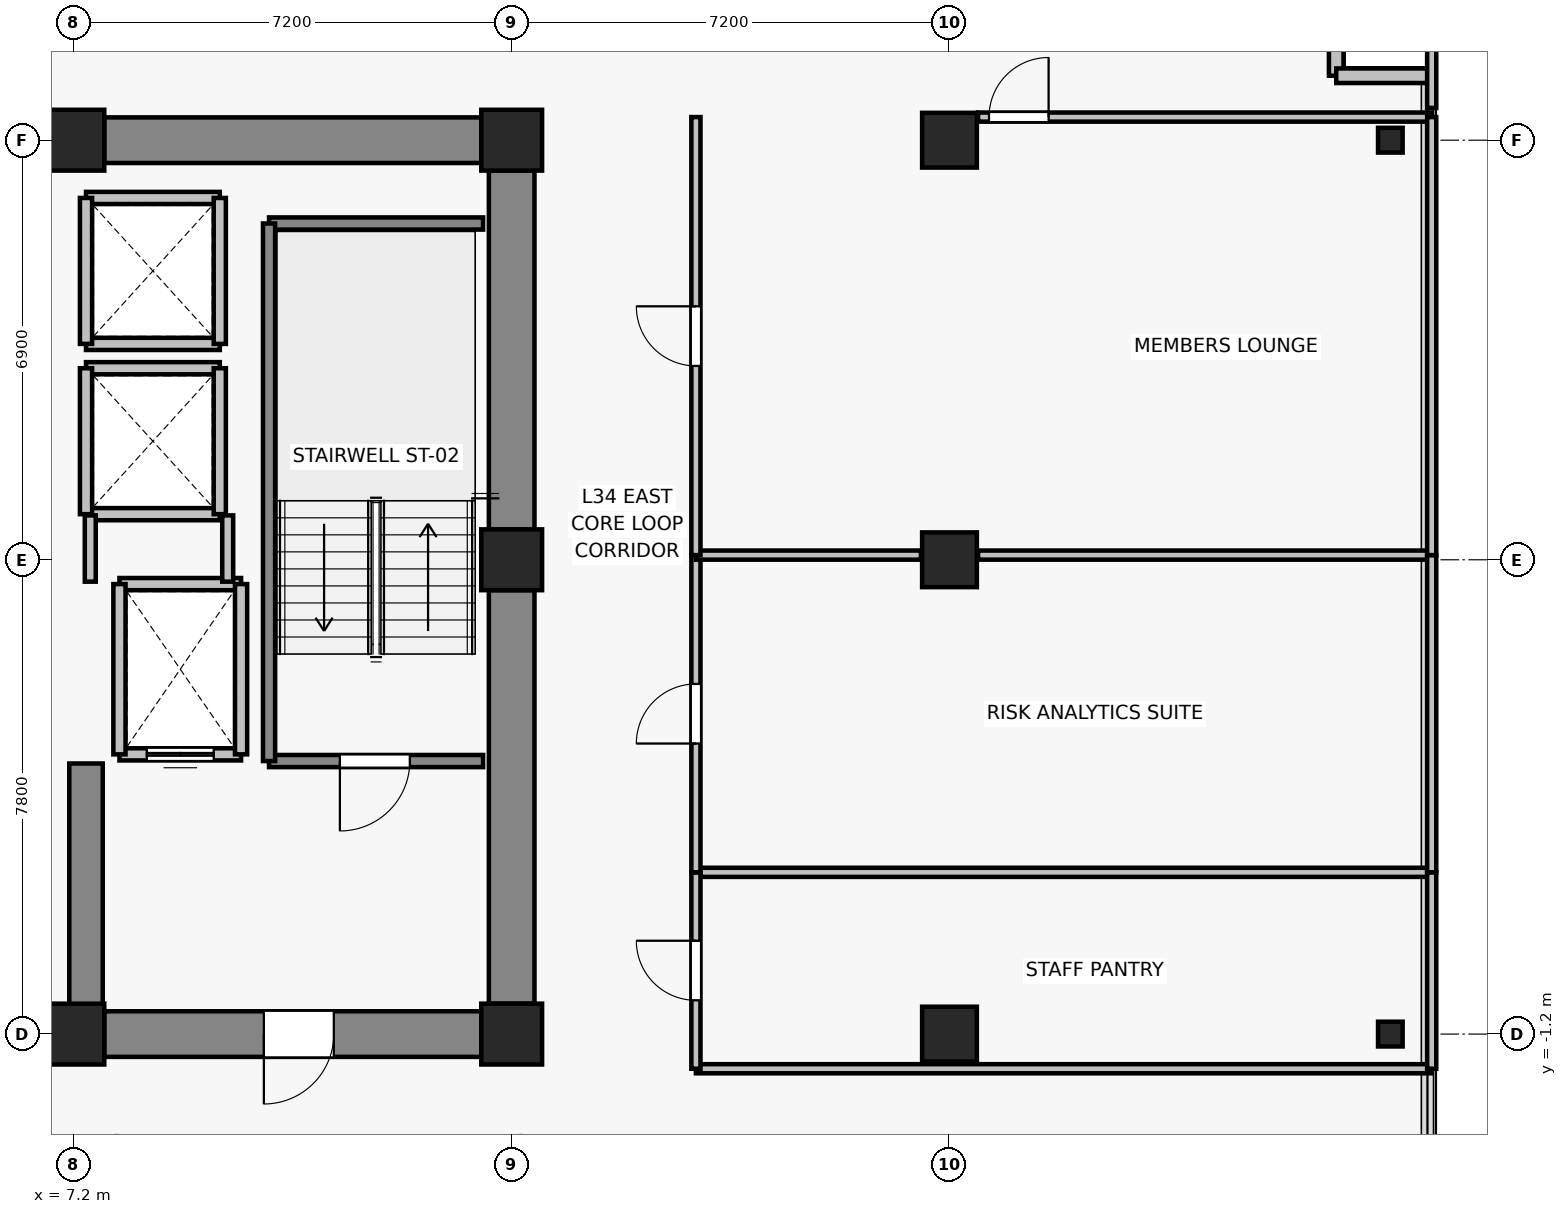
"""IFC4 building model, lengths in metres.
Left out: names, types, materials, properties, quantities, classifications, styles, units other than length and angle.
Written with IfcOpenShell. Run it as: python <this file> out.ifc"""

import sys

from ifc_helpers import new_model, si_unit, direction, frame, frame_2d, origin, origin_2d, place, context, subcontext, project, spatial, rectangle, i_section, extrude, source, transform, mapped, element, fill, save


model = new_model("IFC4")
c1 = context("Model", 3, precision=1e-05, world=origin(), true_north=direction((0.0, 1.0)))
c2 = subcontext(c1, "Body", "Model", "MODEL_VIEW")
j1 = project(units=[si_unit("LENGTHUNIT", "METRE"), si_unit("PLANEANGLEUNIT", "RADIAN")], contexts=[c1])
p1 = place(None, origin())
s1 = spatial("IfcSite", under=j1, at=p1, CompositionType="ELEMENT")
p2 = place(p1, origin())
s2 = spatial("IfcBuilding", under=s1, at=p2, CompositionType="ELEMENT")
p3 = place(p2, frame((0.0, 0.0, 123.1)))
s3 = spatial("IfcBuildingStorey", under=s2, at=p3, CompositionType="ELEMENT", Elevation=123.1)
for number, where, z_axis, x_axis in (
    (1, (7.2, -1.2, 0.0), (0.0, 0.0, 1.0), (1.0, 0.0, 0.0)),
    (2, (14.4, -1.2, 0.0), (0.0, 0.0, 1.0), (1.0, 0.0, 0.0)),
    (3, (14.4, 6.6, 0.0), (0.0, 0.0, 1.0), (1.0, 0.0, 0.0)),
    (4, (7.2, 13.5, 0.0), (0.0, 0.0, 1.0), (1.0, 0.0, 0.0)),
    (5, (14.4, 13.5, 0.0), (0.0, 0.0, 1.0), (1.0, 0.0, 0.0)),
):
    element("IfcColumn", number, at=place(p3, frame(where, z_axis=z_axis, x_axis=x_axis)), inside=s3, PredefinedType="COLUMN", context=c2, shape_type="SweptSolid", body=[
        extrude(rectangle(XDim=1.0, YDim=1.0, at=origin_2d()), origin(), (0.0, 0.0, 1.0), 3.3),
    ])
for number, where, z_axis, x_axis in (
    (6, (21.6, -1.2, 0.0), (0.0, 0.0, 1.0), (1.0, 0.0, 0.0)),
    (7, (21.6, 6.6, 0.0), (0.0, 0.0, 1.0), (1.0, 0.0, 0.0)),
    (8, (21.6, 13.5, 0.0), (0.0, 0.0, 1.0), (1.0, 0.0, 0.0)),
):
    element("IfcColumn", number, at=place(p3, frame(where, z_axis=z_axis, x_axis=x_axis)), inside=s3, PredefinedType="COLUMN", context=c2, shape_type="SweptSolid", body=[
        extrude(rectangle(XDim=0.9, YDim=0.9, at=origin_2d()), origin(), (0.0, 0.0, 1.0), 3.3),
    ])
for number, where, z_axis, x_axis in (
    (9, (28.85, -1.2, 0.0), (0.0, 0.0, 1.0), (1.0, 0.0, 0.0)),
    (10, (28.85, 13.5, 0.0), (0.0, 0.0, 1.0), (1.0, 0.0, 0.0)),
):
    element("IfcColumn", number, at=place(p3, frame(where, z_axis=z_axis, x_axis=x_axis)), inside=s3, PredefinedType="COLUMN", context=c2, shape_type="SweptSolid", body=[
        extrude(i_section(OverallWidth=0.404, OverallDepth=0.407, WebThickness=0.022, FlangeThickness=0.032, FilletRadius=0.015, at=origin_2d()), origin(), (0.0, 0.0, 1.0), 3.3),
    ])
p4 = place(p3, frame((7.7, 13.5, 0.0), z_axis=(0.0, 0.0, 1.0), x_axis=(1.0, 0.0, 0.0)))
e11 = element("IfcWall", 11, at=p4, inside=s3, PredefinedType="SHEAR", context=c2, shape_type="SweptSolid", body=[
    extrude(rectangle(XDim=6.2, YDim=0.75, at=frame_2d((3.1, 0.0))), origin(), (0.0, 0.0, 1.0), 3.075),
])
p5 = place(p3, frame((14.4, -0.7, 0.0), z_axis=(0.0, 0.0, 1.0), x_axis=(0.0, 1.0, 0.0)))
e12 = element("IfcWall", 12, at=p5, inside=s3, PredefinedType="SHEAR", context=c2, shape_type="SweptSolid", body=[
    extrude(rectangle(XDim=6.8, YDim=0.75, at=frame_2d((3.4, 0.0))), origin(), (0.0, 0.0, 1.0), 3.075),
])
p6 = place(p3, frame((14.4, 7.1, 0.0), z_axis=(0.0, 0.0, 1.0), x_axis=(0.0, 1.0, 0.0)))
e13 = element("IfcWall", 13, at=p6, inside=s3, PredefinedType="SHEAR", context=c2, shape_type="SweptSolid", body=[
    extrude(rectangle(XDim=5.9, YDim=0.75, at=frame_2d((2.95, 0.0))), origin(), (0.0, 0.0, 1.0), 3.075),
])
p7 = place(p3, frame((13.9, -1.2, 0.0), z_axis=(0.0, 0.0, 1.0), x_axis=(-1.0, 0.0, 0.0)))
e14 = element("IfcWall", 14, at=p7, inside=s3, PredefinedType="SHEAR", context=c2, shape_type="SweptSolid", body=[
    extrude(rectangle(XDim=6.2, YDim=0.75, at=frame_2d((3.1, 0.0))), origin(), (0.0, 0.0, 1.0), 3.075),
])
p8 = place(p7, frame((2.425, 0.0, 0.0)))
e15 = element("IfcOpeningElement", 15, at=p8, cuts=e14, PredefinedType="OPENING", context=c2, shape_type="SweptSolid", body=[
    extrude(rectangle(XDim=1.15, YDim=2.15, at=frame_2d((0.575, 1.075))), frame((0.0, 0.385, 0.0), z_axis=(0.0, -1.0, 0.0), x_axis=(1.0, 0.0, 0.0)), (0.0, 0.0, 1.0), 0.77),
])
p9 = place(p3, frame((7.4, -0.825, 0.0), z_axis=(0.0, 0.0, 1.0), x_axis=(0.0, 1.0, 0.0)))
e16 = element("IfcWall", 16, at=p9, inside=s3, PredefinedType="SHEAR", context=c2, shape_type="SweptSolid", body=[
    extrude(rectangle(XDim=4.075, YDim=0.55, at=frame_2d((2.038, 0.0))), origin(), (0.0, 0.0, 1.0), 3.075),
])
for number, where, z_axis, x_axis in (
    (17, (27.96, 14.56, 0.0), (0.0, 0.0, 1.0), (0.0, 1.0, 0.0)),
    (18, (29.46, 14.56, 0.0), (0.0, 0.0, 1.0), (-1.0, 0.0, 0.0)),
):
    element("IfcWall", number, at=place(p3, frame(where, z_axis=z_axis, x_axis=x_axis)), inside=s3, PredefinedType="SOLIDWALL", context=c2, shape_type="SweptSolid", body=[
        extrude(rectangle(XDim=1.5, YDim=0.24, at=frame_2d((0.75, 0.0))), origin(), (0.0, 0.0, 1.0), 3.075),
    ])
p10 = place(p3, frame((9.95, 3.4, 0.0), z_axis=(0.0, 0.0, 1.0), x_axis=(-1.0, 0.0, 0.0)))
e19 = element("IfcWall", 19, at=p10, inside=s3, PredefinedType="SOLIDWALL", context=c2, shape_type="SweptSolid", body=[
    extrude(rectangle(XDim=2.0, YDim=0.2, at=frame_2d((1.0, 0.0))), origin(), (0.0, 0.0, 1.0), 3.075),
])
p11 = place(p10, frame((0.45, 0.0, 0.0)))
e20 = element("IfcOpeningElement", 20, at=p11, cuts=e19, PredefinedType="OPENING", context=c2, shape_type="SweptSolid", body=[
    extrude(rectangle(XDim=1.1, YDim=2.2, at=frame_2d((0.55, 1.1))), frame((0.0, 0.11, 0.0), z_axis=(0.0, -1.0, 0.0), x_axis=(1.0, 0.0, 0.0)), (0.0, 0.0, 1.0), 0.22),
])
p12 = place(p3, frame((7.95, 6.2, 0.0), z_axis=(0.0, 0.0, 1.0), x_axis=(1.0, 0.0, 0.0)))
e21 = element("IfcWall", 21, at=p12, inside=s3, PredefinedType="SOLIDWALL", context=c2, shape_type="SweptSolid", body=[
    extrude(rectangle(XDim=2.0, YDim=0.2, at=frame_2d((1.0, 0.0))), origin(), (0.0, 0.0, 1.0), 3.075),
])
for number, where, z_axis, x_axis in (
    (22, (7.95, 3.4, 0.0), (0.0, 0.0, 1.0), (0.0, 1.0, 0.0)),
    (23, (9.95, 6.2, 0.0), (0.0, 0.0, 1.0), (0.0, -1.0, 0.0)),
):
    element("IfcWall", number, at=place(p3, frame(where, z_axis=z_axis, x_axis=x_axis)), inside=s3, PredefinedType="SOLIDWALL", context=c2, shape_type="SweptSolid", body=[
        extrude(rectangle(XDim=2.8, YDim=0.2, at=frame_2d((1.4, 0.0))), origin(), (0.0, 0.0, 1.0), 3.075),
    ])
for number, where, z_axis, x_axis in (
    (24, (9.6, 7.35, 0.0), (0.0, 0.0, 1.0), (-1.0, 0.0, 0.0)),
    (25, (7.4, 9.75, 0.0), (0.0, 0.0, 1.0), (1.0, 0.0, 0.0)),
):
    element("IfcWall", number, at=place(p3, frame(where, z_axis=z_axis, x_axis=x_axis)), inside=s3, PredefinedType="SOLIDWALL", context=c2, shape_type="SweptSolid", body=[
        extrude(rectangle(XDim=2.2, YDim=0.2, at=frame_2d((1.1, 0.0))), origin(), (0.0, 0.0, 1.0), 2.515),
    ])
p13 = place(p3, frame((7.4, 7.35, 0.0), z_axis=(0.0, 0.0, 1.0), x_axis=(0.0, 1.0, 0.0)))
e26 = element("IfcWall", 26, at=p13, inside=s3, PredefinedType="SOLIDWALL", context=c2, shape_type="SweptSolid", body=[
    extrude(rectangle(XDim=2.4, YDim=0.2, at=frame_2d((1.2, 0.0))), origin(), (0.0, 0.0, 1.0), 2.515),
])
p14 = place(p3, frame((9.6, 9.75, 0.0), z_axis=(0.0, 0.0, 1.0), x_axis=(0.0, -1.0, 0.0)))
e27 = element("IfcWall", 27, at=p14, inside=s3, PredefinedType="SOLIDWALL", context=c2, shape_type="SweptSolid", body=[
    extrude(rectangle(XDim=2.4, YDim=0.2, at=frame_2d((1.2, 0.0))), origin(), (0.0, 0.0, 1.0), 3.075),
])
for number, where, z_axis, x_axis in (
    (28, (9.6, 10.15, 0.0), (0.0, 0.0, 1.0), (-1.0, 0.0, 0.0)),
    (29, (7.4, 12.55, 0.0), (0.0, 0.0, 1.0), (1.0, 0.0, 0.0)),
):
    element("IfcWall", number, at=place(p3, frame(where, z_axis=z_axis, x_axis=x_axis)), inside=s3, PredefinedType="SOLIDWALL", context=c2, shape_type="SweptSolid", body=[
        extrude(rectangle(XDim=2.2, YDim=0.2, at=frame_2d((1.1, 0.0))), origin(), (0.0, 0.0, 1.0), 2.515),
    ])
p15 = place(p3, frame((7.4, 10.15, 0.0), z_axis=(0.0, 0.0, 1.0), x_axis=(0.0, 1.0, 0.0)))
e30 = element("IfcWall", 30, at=p15, inside=s3, PredefinedType="SOLIDWALL", context=c2, shape_type="SweptSolid", body=[
    extrude(rectangle(XDim=2.4, YDim=0.2, at=frame_2d((1.2, 0.0))), origin(), (0.0, 0.0, 1.0), 2.515),
])
p16 = place(p3, frame((9.6, 12.55, 0.0), z_axis=(0.0, 0.0, 1.0), x_axis=(0.0, -1.0, 0.0)))
e31 = element("IfcWall", 31, at=p16, inside=s3, PredefinedType="SOLIDWALL", context=c2, shape_type="SweptSolid", body=[
    extrude(rectangle(XDim=2.4, YDim=0.2, at=frame_2d((1.2, 0.0))), origin(), (0.0, 0.0, 1.0), 3.075),
])
p17 = place(p3, frame((13.93, 3.29, 0.0), z_axis=(0.0, 0.0, 1.0), x_axis=(-1.0, 0.0, 0.0)))
e32 = element("IfcWall", 32, at=p17, inside=s3, PredefinedType="SOLIDWALL", context=c2, shape_type="SweptSolid", body=[
    extrude(rectangle(XDim=3.52, YDim=0.2, at=frame_2d((1.76, 0.0))), origin(), (0.0, 0.0, 1.0), 3.075),
])
p18 = place(p17, frame((1.205, 0.0, 0.0)))
e33 = element("IfcOpeningElement", 33, at=p18, cuts=e32, PredefinedType="OPENING", context=c2, shape_type="SweptSolid", body=[
    extrude(rectangle(XDim=1.15, YDim=2.15, at=frame_2d((0.575, 1.075))), frame((0.0, 0.11, 0.0), z_axis=(0.0, -1.0, 0.0), x_axis=(1.0, 0.0, 0.0)), (0.0, 0.0, 1.0), 0.22),
])
p19 = place(p3, frame((10.41, 12.13, 0.0), z_axis=(0.0, 0.0, 1.0), x_axis=(1.0, 0.0, 0.0)))
e34 = element("IfcWall", 34, at=p19, inside=s3, PredefinedType="SOLIDWALL", context=c2, shape_type="SweptSolid", body=[
    extrude(rectangle(XDim=3.52, YDim=0.2, at=frame_2d((1.76, 0.0))), origin(), (0.0, 0.0, 1.0), 3.075),
])
p20 = place(p3, frame((10.41, 3.29, 0.0), z_axis=(0.0, 0.0, 1.0), x_axis=(0.0, 1.0, 0.0)))
e35 = element("IfcWall", 35, at=p20, inside=s3, PredefinedType="SOLIDWALL", context=c2, shape_type="SweptSolid", body=[
    extrude(rectangle(XDim=8.84, YDim=0.2, at=frame_2d((4.42, 0.0))), origin(), (0.0, 0.0, 1.0), 3.075),
])
p21 = place(p3, frame((7.47, 6.24, 0.0), z_axis=(0.0, 0.0, 1.0), x_axis=(0.0, 1.0, 0.0)))
e36 = element("IfcWall", 36, at=p21, inside=s3, PredefinedType="PARTITIONING", context=c2, shape_type="SweptSolid", body=[
    extrude(rectangle(XDim=1.09, YDim=0.18, at=frame_2d((0.545, 0.0))), origin(), (0.0, 0.0, 1.0), 2.515),
])
p22 = place(p3, frame((9.73, 7.33, 0.0), z_axis=(0.0, 0.0, 1.0), x_axis=(0.0, -1.0, 0.0)))
e37 = element("IfcWall", 37, at=p22, inside=s3, PredefinedType="PARTITIONING", context=c2, shape_type="SweptSolid", body=[
    extrude(rectangle(XDim=1.09, YDim=0.18, at=frame_2d((0.545, 0.0))), origin(), (0.0, 0.0, 1.0), 3.075),
])
for number, where, z_axis, x_axis in (
    (38, (29.53, -1.77, 0.0), (0.0, 0.0, 1.0), (-1.0, 0.0, 0.0)),
    (39, (17.43, 1.46, 0.0), (0.0, 0.0, 1.0), (1.0, 0.0, 0.0)),
):
    element("IfcWall", number, at=place(p3, frame(where, z_axis=z_axis, x_axis=x_axis)), inside=s3, PredefinedType="PARTITIONING", context=c2, shape_type="SweptSolid", body=[
        extrude(rectangle(XDim=12.1, YDim=0.15, at=frame_2d((6.05, 0.0))), origin(), (0.0, 0.0, 1.0), 2.515),
    ])
p23 = place(p3, frame((17.43, -1.77, 0.0), z_axis=(0.0, 0.0, 1.0), x_axis=(0.0, 1.0, 0.0)))
e40 = element("IfcWall", 40, at=p23, inside=s3, PredefinedType="PARTITIONING", context=c2, shape_type="SweptSolid", body=[
    extrude(rectangle(XDim=3.23, YDim=0.15, at=frame_2d((1.615, 0.0))), origin(), (0.0, 0.0, 1.0), 2.515),
])
p24 = place(p23, frame((1.125, 0.0, 0.0)))
e41 = element("IfcOpeningElement", 41, at=p24, cuts=e40, PredefinedType="OPENING", context=c2, shape_type="SweptSolid", body=[
    extrude(rectangle(XDim=0.98, YDim=2.15, at=frame_2d((0.49, 1.075))), frame((0.0, 0.085, 0.0), z_axis=(0.0, -1.0, 0.0), x_axis=(1.0, 0.0, 0.0)), (0.0, 0.0, 1.0), 0.17),
])
p25 = place(p3, frame((29.53, 1.46, 0.0), z_axis=(0.0, 0.0, 1.0), x_axis=(0.0, -1.0, 0.0)))
e42 = element("IfcWall", 42, at=p25, inside=s3, PredefinedType="PARTITIONING", context=c2, shape_type="SweptSolid", body=[
    extrude(rectangle(XDim=3.23, YDim=0.15, at=frame_2d((1.615, 0.0))), origin(), (0.0, 0.0, 1.0), 3.075),
])
p26 = place(p3, frame((22.07, 6.677, 0.0), z_axis=(0.0, 0.0, 1.0), x_axis=(1.0, 0.0, 0.0)))
e43 = element("IfcWall", 43, at=p26, inside=s3, PredefinedType="PARTITIONING", context=c2, shape_type="SweptSolid", body=[
    extrude(rectangle(XDim=7.46, YDim=0.15, at=frame_2d((3.73, 0.0))), origin(), (0.0, 0.0, 1.0), 2.565),
])
p27 = place(p3, frame((17.43, 1.46, 0.0), z_axis=(0.0, 0.0, 1.0), x_axis=(0.0, 1.0, 0.0)))
e44 = element("IfcWall", 44, at=p27, inside=s3, PredefinedType="PARTITIONING", context=c2, shape_type="SweptSolid", body=[
    extrude(rectangle(XDim=5.217, YDim=0.15, at=frame_2d((2.608, 0.0))), origin(), (0.0, 0.0, 1.0), 2.515),
])
p28 = place(p27, frame((2.118, 0.0, 0.0)))
e45 = element("IfcOpeningElement", 45, at=p28, cuts=e44, PredefinedType="OPENING", context=c2, shape_type="SweptSolid", body=[
    extrude(rectangle(XDim=0.98, YDim=2.15, at=frame_2d((0.49, 1.075))), frame((0.0, 0.085, 0.0), z_axis=(0.0, -1.0, 0.0), x_axis=(1.0, 0.0, 0.0)), (0.0, 0.0, 1.0), 0.17),
])
p29 = place(p3, frame((29.53, 6.677, 0.0), z_axis=(0.0, 0.0, 1.0), x_axis=(0.0, -1.0, 0.0)))
e46 = element("IfcWall", 46, at=p29, inside=s3, PredefinedType="PARTITIONING", context=c2, shape_type="SweptSolid", body=[
    extrude(rectangle(XDim=5.217, YDim=0.15, at=frame_2d((2.608, 0.0))), origin(), (0.0, 0.0, 1.0), 3.075),
])
p30 = place(p3, frame((21.13, 6.677, 0.0), z_axis=(0.0, 0.0, 1.0), x_axis=(-1.0, 0.0, 0.0)))
e47 = element("IfcWall", 47, at=p30, inside=s3, PredefinedType="PARTITIONING", context=c2, shape_type="SweptSolid", body=[
    extrude(rectangle(XDim=3.7, YDim=0.15, at=frame_2d((1.85, 0.0))), origin(), (0.0, 0.0, 1.0), 2.515),
])
p31 = place(p3, frame((22.07, 13.88, 0.0), z_axis=(0.0, 0.0, 1.0), x_axis=(1.0, 0.0, 0.0)))
e48 = element("IfcWall", 48, at=p31, inside=s3, PredefinedType="PARTITIONING", context=c2, shape_type="SweptSolid", body=[
    extrude(rectangle(XDim=7.46, YDim=0.15, at=frame_2d((3.73, 0.0))), origin(), (0.0, 0.0, 1.0), 3.075),
])
p32 = place(p31, frame((0.18, 0.0, 0.0)))
e49 = element("IfcOpeningElement", 49, at=p32, cuts=e48, PredefinedType="OPENING", context=c2, shape_type="SweptSolid", body=[
    extrude(rectangle(XDim=0.98, YDim=2.15, at=frame_2d((0.49, 1.075))), frame((0.0, 0.085, 0.0), z_axis=(0.0, -1.0, 0.0), x_axis=(1.0, 0.0, 0.0)), (0.0, 0.0, 1.0), 0.17),
])
p33 = place(p3, frame((17.43, 6.677, 0.0), z_axis=(0.0, 0.0, 1.0), x_axis=(0.0, 1.0, 0.0)))
e50 = element("IfcWall", 50, at=p33, inside=s3, PredefinedType="PARTITIONING", context=c2, shape_type="SweptSolid", body=[
    extrude(rectangle(XDim=7.203, YDim=0.15, at=frame_2d((3.602, 0.0))), origin(), (0.0, 0.0, 1.0), 2.515),
])
p34 = place(p33, frame((3.111, 0.0, 0.0)))
e51 = element("IfcOpeningElement", 51, at=p34, cuts=e50, PredefinedType="OPENING", context=c2, shape_type="SweptSolid", body=[
    extrude(rectangle(XDim=0.98, YDim=2.15, at=frame_2d((0.49, 1.075))), frame((0.0, 0.085, 0.0), z_axis=(0.0, -1.0, 0.0), x_axis=(1.0, 0.0, 0.0)), (0.0, 0.0, 1.0), 0.17),
])
p35 = place(p3, frame((29.53, 13.88, 0.0), z_axis=(0.0, 0.0, 1.0), x_axis=(0.0, -1.0, 0.0)))
e52 = element("IfcWall", 52, at=p35, inside=s3, PredefinedType="PARTITIONING", context=c2, shape_type="SweptSolid", body=[
    extrude(rectangle(XDim=7.203, YDim=0.15, at=frame_2d((3.602, 0.0))), origin(), (0.0, 0.0, 1.0), 3.075),
])
p36 = place(p3, frame((29.53, 17.63, 0.0), z_axis=(0.0, 0.0, 1.0), x_axis=(0.0, -1.0, 0.0)))
e53 = element("IfcWall", 53, at=p36, inside=s3, PredefinedType="PARTITIONING", context=c2, shape_type="SweptSolid", body=[
    extrude(rectangle(XDim=3.6, YDim=0.15, at=frame_2d((1.8, 0.0))), origin(), (0.0, 0.0, 1.0), 3.075),
])
m1 = source(origin(), c2, "Body", "SweptSolid", [
    extrude(rectangle(XDim=1.1, YDim=2.2, at=frame_2d((0.55, 1.1))), frame((0.0, 0.025, 0.0), z_axis=(0.0, -1.0, 0.0), x_axis=(1.0, 0.0, 0.0)), (0.0, 0.0, 1.0), 0.05),
])
p37 = place(p11, origin())
e54 = element("IfcDoor", 54, at=p37, inside=s3, OperationType="DOUBLE_DOOR_SLIDING", PredefinedType="DOOR", context=c2, shape_type="MappedRepresentation", body=[
    mapped(m1, transform((0.0, 0.0, 0.0), x_axis=(1.0, 0.0, 0.0), y_axis=(0.0, 1.0, 0.0), z_axis=(0.0, 0.0, 1.0), scale=1.0)),
])
fill(e20, e54)
m2 = source(origin(), c2, "Body", "SweptSolid", [
    extrude(rectangle(XDim=1.15, YDim=2.15, at=frame_2d((0.575, 1.075))), frame((0.0, 0.025, 0.0), z_axis=(0.0, -1.0, 0.0), x_axis=(1.0, 0.0, 0.0)), (0.0, 0.0, 1.0), 0.05),
])
p38 = place(p18, origin())
e55 = element("IfcDoor", 55, at=p38, inside=s3, OperationType="SINGLE_SWING_RIGHT", PredefinedType="DOOR", context=c2, shape_type="MappedRepresentation", body=[
    mapped(m2, transform((0.0, 0.0, 0.0), x_axis=(1.0, 0.0, 0.0), y_axis=(0.0, 1.0, 0.0), z_axis=(0.0, 0.0, 1.0), scale=1.0)),
])
fill(e33, e55)
p39 = place(p8, origin())
e56 = element("IfcDoor", 56, at=p39, inside=s3, OperationType="SINGLE_SWING_RIGHT", PredefinedType="DOOR", context=c2, shape_type="MappedRepresentation", body=[
    mapped(m2, transform((0.0, 0.0, 0.0), x_axis=(1.0, 0.0, 0.0), y_axis=(0.0, 1.0, 0.0), z_axis=(0.0, 0.0, 1.0), scale=1.0)),
])
fill(e15, e56)
m3 = source(origin(), c2, "Body", "SweptSolid", [
    extrude(rectangle(XDim=0.98, YDim=2.15, at=frame_2d((0.49, 1.075))), frame((0.0, 0.025, 0.0), z_axis=(0.0, -1.0, 0.0), x_axis=(1.0, 0.0, 0.0)), (0.0, 0.0, 1.0), 0.05),
])
p40 = place(p24, origin())
e57 = element("IfcDoor", 57, at=p40, inside=s3, OperationType="SINGLE_SWING_RIGHT", PredefinedType="DOOR", context=c2, shape_type="MappedRepresentation", body=[
    mapped(m3, transform((0.0, 0.0, 0.0), x_axis=(1.0, 0.0, 0.0), y_axis=(0.0, 1.0, 0.0), z_axis=(0.0, 0.0, 1.0), scale=1.0)),
])
fill(e41, e57)
p41 = place(p28, origin())
e58 = element("IfcDoor", 58, at=p41, inside=s3, OperationType="SINGLE_SWING_LEFT", PredefinedType="DOOR", context=c2, shape_type="MappedRepresentation", body=[
    mapped(m3, transform((0.0, 0.0, 0.0), x_axis=(1.0, 0.0, 0.0), y_axis=(0.0, 1.0, 0.0), z_axis=(0.0, 0.0, 1.0), scale=1.0)),
])
fill(e45, e58)
p42 = place(p34, origin())
e59 = element("IfcDoor", 59, at=p42, inside=s3, OperationType="SINGLE_SWING_RIGHT", PredefinedType="DOOR", context=c2, shape_type="MappedRepresentation", body=[
    mapped(m3, transform((0.0, 0.0, 0.0), x_axis=(1.0, 0.0, 0.0), y_axis=(0.0, 1.0, 0.0), z_axis=(0.0, 0.0, 1.0), scale=1.0)),
])
fill(e51, e59)
p43 = place(p32, origin())
e60 = element("IfcDoor", 60, at=p43, inside=s3, OperationType="SINGLE_SWING_RIGHT", PredefinedType="DOOR", context=c2, shape_type="MappedRepresentation", body=[
    mapped(m3, transform((0.0, 0.0, 0.0), x_axis=(1.0, 0.0, 0.0), y_axis=(0.0, 1.0, 0.0), z_axis=(0.0, 0.0, 1.0), scale=1.0)),
])
fill(e49, e60)
save(model, sys.argv[1])
